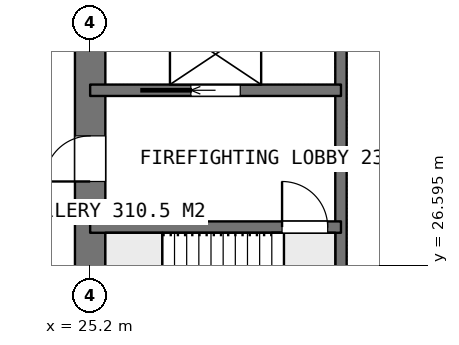
"""IFC4 building model, lengths in metres.
Left out: names, types, materials, properties, quantities, classifications, styles, units other than length and angle.
Written with IfcOpenShell. Run it as: python <this file> out.ifc"""

import sys

from ifc_helpers import new_model, si_unit, direction, frame, frame_2d, origin, place, context, subcontext, project, spatial, rectangle, extrude, element, fill, save


model = new_model("IFC4")
c1 = context("Model", 3, precision=1e-05, world=origin(), true_north=direction((0.0, 1.0)))
c2 = subcontext(c1, "Body", "Model", "MODEL_VIEW")
j1 = project(units=[si_unit("LENGTHUNIT", "METRE"), si_unit("PLANEANGLEUNIT", "RADIAN")], contexts=[c1])
p1 = place(None, origin())
s1 = spatial("IfcSite", under=j1, at=p1, CompositionType="ELEMENT")
p2 = place(p1, origin())
s2 = spatial("IfcBuilding", under=s1, at=p2, CompositionType="ELEMENT")
p3 = place(p2, frame((0.0, 0.0, 291.35)))
s3 = spatial("IfcBuildingStorey", under=s2, at=p3, CompositionType="ELEMENT", Elevation=291.35)
p4 = place(p3, frame((25.2, 21.0, 0.0), z_axis=(0.0, 0.0, 1.0), x_axis=(0.0, 1.0, 0.0)))
e1 = element("IfcWall", 1, at=p4, inside=s3, PredefinedType="SHEAR", context=c2, shape_type="SweptSolid", body=[
    extrude(rectangle(XDim=25.2, YDim=0.8, at=frame_2d((12.6, 0.0))), origin(), (0.0, 0.0, 1.0), 5.4),
])
p5 = place(p4, frame((7.8, 0.0, 0.0)))
e2 = element("IfcOpeningElement", 2, at=p5, cuts=e1, PredefinedType="OPENING", context=c2, shape_type="SweptSolid", body=[
    extrude(rectangle(XDim=1.2, YDim=2.1, at=frame_2d((0.6, 1.05))), frame((0.0, 0.41, 0.0), z_axis=(0.0, -1.0, 0.0), x_axis=(1.0, 0.0, 0.0)), (0.0, 0.0, 1.0), 0.82),
])
p6 = place(p4, frame((14.25, 0.0, 0.0)))
e3 = element("IfcOpeningElement", 3, at=p6, cuts=e1, PredefinedType="OPENING", context=c2, shape_type="SweptSolid", body=[
    extrude(rectangle(XDim=0.9, YDim=2.1, at=frame_2d((0.45, 1.05))), frame((0.0, 0.41, 0.0), z_axis=(0.0, -1.0, 0.0), x_axis=(1.0, 0.0, 0.0)), (0.0, 0.0, 1.0), 0.82),
])
p7 = place(p4, frame((16.85, 0.0, 0.0)))
e4 = element("IfcOpeningElement", 4, at=p7, cuts=e1, PredefinedType="OPENING", context=c2, shape_type="SweptSolid", body=[
    extrude(rectangle(XDim=0.9, YDim=2.1, at=frame_2d((0.45, 1.05))), frame((0.0, 0.41, 0.0), z_axis=(0.0, -1.0, 0.0), x_axis=(1.0, 0.0, 0.0)), (0.0, 0.0, 1.0), 0.82),
])
p8 = place(p4, frame((18.95, 0.0, 0.0)))
e5 = element("IfcOpeningElement", 5, at=p8, cuts=e1, PredefinedType="OPENING", context=c2, shape_type="SweptSolid", body=[
    extrude(rectangle(XDim=1.2, YDim=2.1, at=frame_2d((0.6, 1.05))), frame((0.0, 0.41, 0.0), z_axis=(0.0, -1.0, 0.0), x_axis=(1.0, 0.0, 0.0)), (0.0, 0.0, 1.0), 0.82),
])
p9 = place(p3, frame((31.8, 21.0, 0.0), z_axis=(0.0, 0.0, 1.0), x_axis=(0.0, 1.0, 0.0)))
e6 = element("IfcWall", 6, at=p9, inside=s3, PredefinedType="SHEAR", context=c2, shape_type="SweptSolid", body=[
    extrude(rectangle(XDim=25.2, YDim=0.3, at=frame_2d((12.6, 0.0))), origin(), (0.0, 0.0, 1.0), 5.4),
])
p10 = place(p3, frame((25.2, 27.6, 0.0), z_axis=(0.0, 0.0, 1.0), x_axis=(1.0, 0.0, 0.0)))
e7 = element("IfcWall", 7, at=p10, inside=s3, PredefinedType="SHEAR", context=c2, shape_type="SweptSolid", body=[
    extrude(rectangle(XDim=6.6, YDim=0.3, at=frame_2d((3.3, 0.0))), origin(), (0.0, 0.0, 1.0), 5.4),
])
p11 = place(p10, frame((5.05, 0.0, 0.0)))
e8 = element("IfcOpeningElement", 8, at=p11, cuts=e7, PredefinedType="OPENING", context=c2, shape_type="SweptSolid", body=[
    extrude(rectangle(XDim=1.2, YDim=2.1, at=frame_2d((0.6, 1.05))), frame((0.0, 0.16, 0.0), z_axis=(0.0, -1.0, 0.0), x_axis=(1.0, 0.0, 0.0)), (0.0, 0.0, 1.0), 0.32),
])
p12 = place(p3, frame((25.2, 31.2, 0.0), z_axis=(0.0, 0.0, 1.0), x_axis=(1.0, 0.0, 0.0)))
e9 = element("IfcWall", 9, at=p12, inside=s3, PredefinedType="SHEAR", context=c2, shape_type="SweptSolid", body=[
    extrude(rectangle(XDim=6.6, YDim=0.3, at=frame_2d((3.3, 0.0))), origin(), (0.0, 0.0, 1.0), 5.4),
])
p13 = place(p12, frame((2.65, 0.0, 0.0)))
e10 = element("IfcOpeningElement", 10, at=p13, cuts=e9, PredefinedType="OPENING", context=c2, shape_type="SweptSolid", body=[
    extrude(rectangle(XDim=1.3, YDim=2.1, at=frame_2d((0.65, 1.05))), frame((0.0, 0.16, 0.0), z_axis=(0.0, -1.0, 0.0), x_axis=(1.0, 0.0, 0.0)), (0.0, 0.0, 1.0), 0.32),
])
p14 = place(p3, frame((31.95, 29.4, 0.0), z_axis=(0.0, 0.0, 1.0), x_axis=(1.0, 0.0, 0.0)))
e11 = element("IfcWall", 11, at=p14, inside=s3, PredefinedType="PARTITIONING", context=c2, shape_type="SweptSolid", body=[
    extrude(rectangle(XDim=3.5, YDim=0.2, at=frame_2d((1.75, 0.0))), origin(), (0.0, 0.0, 1.0), 5.1),
])
p15 = place(p5, origin())
e12 = element("IfcDoor", 12, at=p15, inside=s3, OperationType="SINGLE_SWING_LEFT", PredefinedType="DOOR", context=c2, shape_type="SweptSolid", body=[
    extrude(rectangle(XDim=1.2, YDim=2.1, at=frame_2d((0.6, 1.05))), frame((0.0, 0.025, 0.0), z_axis=(0.0, -1.0, 0.0), x_axis=(1.0, 0.0, 0.0)), (0.0, 0.0, 1.0), 0.05),
])
fill(e2, e12)
p16 = place(p13, origin())
e13 = element("IfcDoor", 13, at=p16, inside=s3, OperationType="SLIDING_TO_LEFT", PredefinedType="USERDEFINED", context=c2, shape_type="SweptSolid", body=[
    extrude(rectangle(XDim=1.3, YDim=2.1, at=frame_2d((0.65, 1.05))), frame((0.0, 0.025, 0.0), z_axis=(0.0, -1.0, 0.0), x_axis=(1.0, 0.0, 0.0)), (0.0, 0.0, 1.0), 0.05),
])
fill(e10, e13)
p17 = place(p11, origin())
e14 = element("IfcDoor", 14, at=p17, inside=s3, OperationType="SINGLE_SWING_RIGHT", PredefinedType="DOOR", context=c2, shape_type="SweptSolid", body=[
    extrude(rectangle(XDim=1.2, YDim=2.1, at=frame_2d((0.6, 1.05))), frame((0.0, 0.025, 0.0), z_axis=(0.0, -1.0, 0.0), x_axis=(1.0, 0.0, 0.0)), (0.0, 0.0, 1.0), 0.05),
])
fill(e8, e14)
save(model, sys.argv[1])
